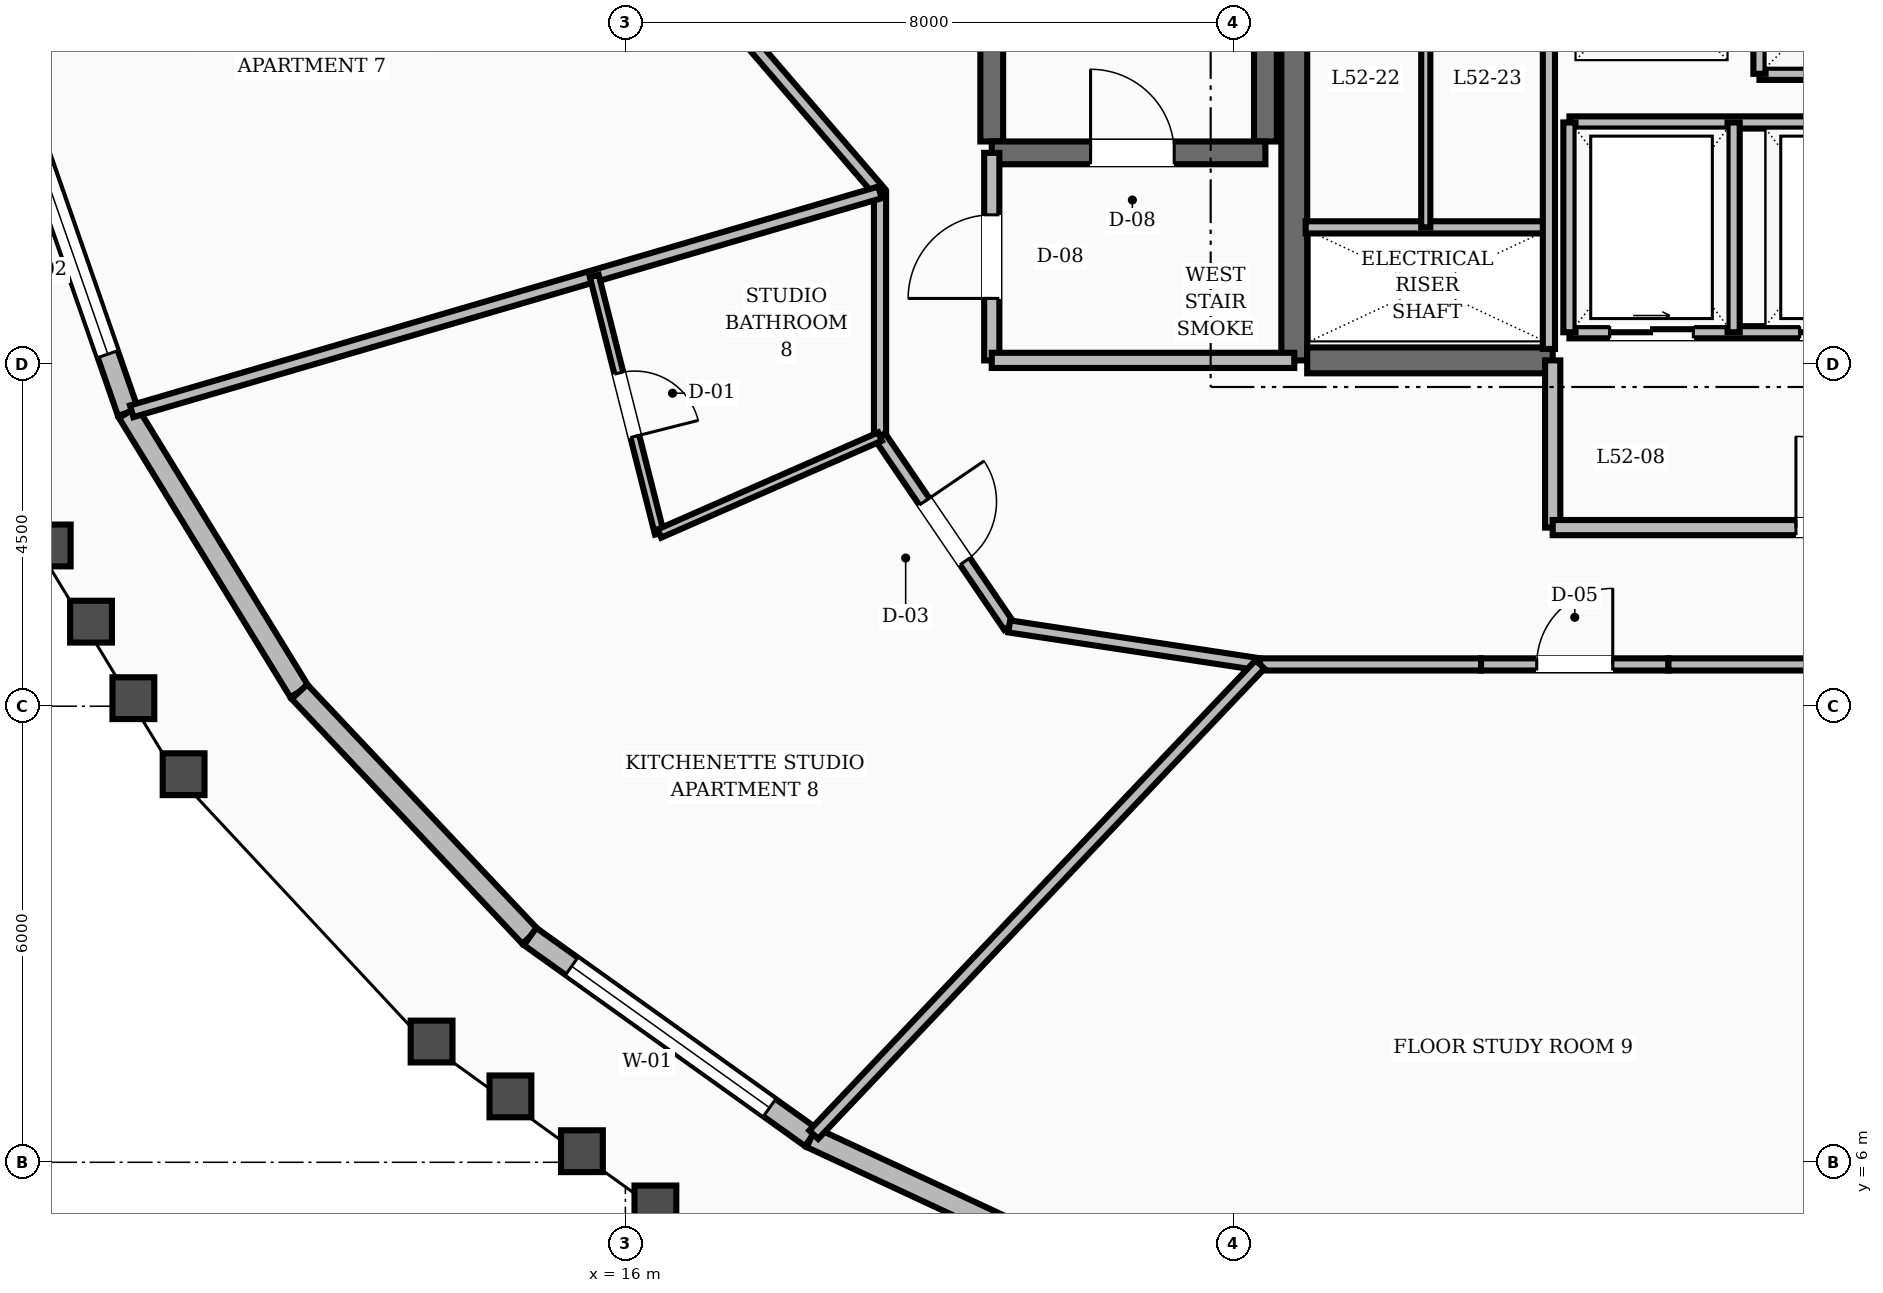
"""IFC4 building model, lengths in metres.
Left out: names, types, materials, properties, quantities, classifications, styles, units other than length and angle.
Written with IfcOpenShell. Run it as: python <this file> out.ifc"""

import sys

from ifc_helpers import new_model, si_unit, direction, frame, frame_2d, origin, place, context, subcontext, project, spatial, rectangle, extrude, element, fill, save


model = new_model("IFC4")
c1 = context("Model", 3, precision=1e-05, world=origin(), true_north=direction((0.0, 1.0)))
c2 = subcontext(c1, "Body", "Model", "MODEL_VIEW")
j1 = project(units=[si_unit("LENGTHUNIT", "METRE"), si_unit("PLANEANGLEUNIT", "RADIAN")], contexts=[c1])
p1 = place(None, origin())
s1 = spatial("IfcSite", under=j1, at=p1, CompositionType="ELEMENT")
p2 = place(p1, origin())
s2 = spatial("IfcBuilding", under=s1, at=p2, CompositionType="ELEMENT")
p3 = place(p2, frame((0.0, 0.0, 200.0)))
s3 = spatial("IfcBuildingStorey", under=s2, at=p3, CompositionType="ELEMENT", Elevation=200.0)
p4 = place(p3, frame((24.8, 16.55, 0.0), z_axis=(0.0, 0.0, 1.0), x_axis=(0.0, 1.0, 0.0)))
e1 = element("IfcWall", 1, at=p4, inside=s3, PredefinedType="SHEAR", context=c2, shape_type="SweptSolid", body=[
    extrude(rectangle(XDim=6.3, YDim=0.34, at=frame_2d((3.15, 0.0))), origin(), (0.0, 0.0, 1.0), 3.6),
])
p5 = place(p3, frame((24.97, 16.55, 0.0), z_axis=(0.0, 0.0, 1.0), x_axis=(1.0, 0.0, 0.0)))
e2 = element("IfcWall", 2, at=p5, inside=s3, PredefinedType="SHEAR", context=c2, shape_type="SweptSolid", body=[
    extrude(rectangle(XDim=3.23, YDim=0.34, at=frame_2d((1.615, 0.0))), origin(), (0.0, 0.0, 1.0), 3.6),
])
for number, where, z_axis, x_axis in (
    (3, (20.82, 19.43, 0.0), (0.0, 0.0, 1.0), (0.0, 1.0, 0.0)),
    (4, (24.42, 19.43, 0.0), (0.0, 0.0, 1.0), (0.0, 1.0, 0.0)),
):
    element("IfcWall", number, at=place(p3, frame(where, z_axis=z_axis, x_axis=x_axis)), inside=s3, PredefinedType="SHEAR", context=c2, shape_type="SweptSolid", body=[
        extrude(rectangle(XDim=8.74, YDim=0.3, at=frame_2d((4.37, 0.0))), origin(), (0.0, 0.0, 1.0), 3.6),
    ])
p6 = place(p3, frame((20.82, 19.28, 0.0), z_axis=(0.0, 0.0, 1.0), x_axis=(1.0, 0.0, 0.0)))
e5 = element("IfcWall", 5, at=p6, inside=s3, PredefinedType="SHEAR", context=c2, shape_type="SweptSolid", body=[
    extrude(rectangle(XDim=3.6, YDim=0.3, at=frame_2d((1.8, 0.0))), origin(), (0.0, 0.0, 1.0), 3.6),
])
p7 = place(p6, frame((1.3, 0.0, 0.0)))
e6 = element("IfcOpeningElement", 6, at=p7, cuts=e5, PredefinedType="OPENING", context=c2, shape_type="SweptSolid", body=[
    extrude(rectangle(XDim=1.1, YDim=2.1, at=frame_2d((0.55, 1.05))), frame((0.0, 0.16, 0.0), z_axis=(0.0, -1.0, 0.0), x_axis=(1.0, 0.0, 0.0)), (0.0, 0.0, 1.0), 0.32),
])
p8 = place(p3, frame((8.068, 19.853, 0.0), z_axis=(0.0, 0.0, 1.0), x_axis=(0.328845805233, -0.94438362776, 0.0)))
e7 = element("IfcWall", 7, at=p8, inside=s3, PredefinedType="STANDARD", context=c2, shape_type="SweptSolid", body=[
    extrude(rectangle(XDim=4.222, YDim=0.28, at=frame_2d((2.111, 0.0))), origin(), (0.0, 0.0, 1.0), 2.77),
])
p9 = place(p8, frame((0.811, 0.0, 0.8)))
e8 = element("IfcOpeningElement", 8, at=p9, cuts=e7, PredefinedType="OPENING", context=c2, shape_type="SweptSolid", body=[
    extrude(rectangle(XDim=2.6, YDim=1.65, at=frame_2d((1.3, 0.825))), frame((0.0, 0.15, 0.0), z_axis=(0.0, -1.0, 0.0), x_axis=(1.0, 0.0, 0.0)), (0.0, 0.0, 1.0), 0.3),
])
p10 = place(p3, frame((9.457, 15.866, 0.0), z_axis=(0.0, 0.0, 1.0), x_axis=(0.522997521468, -0.852334202375, 0.0)))
e9 = element("IfcWall", 9, at=p10, inside=s3, PredefinedType="STANDARD", context=c2, shape_type="SweptSolid", body=[
    extrude(rectangle(XDim=4.312, YDim=0.28, at=frame_2d((2.156, 0.0))), origin(), (0.0, 0.0, 1.0), 2.77),
])
p11 = place(p3, frame((11.712, 12.191, 0.0), z_axis=(0.0, 0.0, 1.0), x_axis=(0.685717407763, -0.727867870352, 0.0)))
e10 = element("IfcWall", 10, at=p11, inside=s3, PredefinedType="STANDARD", context=c2, shape_type="SweptSolid", body=[
    extrude(rectangle(XDim=4.425, YDim=0.28, at=frame_2d((2.213, 0.0))), origin(), (0.0, 0.0, 1.0), 2.77),
])
p12 = place(p3, frame((14.746, 8.97, 0.0), z_axis=(0.0, 0.0, 1.0), x_axis=(0.813519294528, -0.581537924327, 0.0)))
e11 = element("IfcWall", 11, at=p12, inside=s3, PredefinedType="STANDARD", context=c2, shape_type="SweptSolid", body=[
    extrude(rectangle(XDim=4.545, YDim=0.28, at=frame_2d((2.273, 0.0))), origin(), (0.0, 0.0, 1.0), 2.77),
])
p13 = place(p12, frame((0.673, 0.0, 0.8)))
e12 = element("IfcOpeningElement", 12, at=p13, cuts=e11, PredefinedType="OPENING", context=c2, shape_type="SweptSolid", body=[
    extrude(rectangle(XDim=3.2, YDim=1.65, at=frame_2d((1.6, 0.825))), frame((0.0, 0.15, 0.0), z_axis=(0.0, -1.0, 0.0), x_axis=(1.0, 0.0, 0.0)), (0.0, 0.0, 1.0), 0.3),
])
p14 = place(p3, frame((18.444, 6.327, 0.0), z_axis=(0.0, 0.0, 1.0), x_axis=(0.906555409807, -0.422086826315, 0.0)))
e13 = element("IfcWall", 13, at=p14, inside=s3, PredefinedType="STANDARD", context=c2, shape_type="SweptSolid", body=[
    extrude(rectangle(XDim=4.653, YDim=0.28, at=frame_2d((2.327, 0.0))), origin(), (0.0, 0.0, 1.0), 2.77),
])
p15 = place(p3, frame((20.82, 16.55, 0.0), z_axis=(0.0, 0.0, 1.0), x_axis=(0.0, 1.0, 0.0)))
e14 = element("IfcWall", 14, at=p15, inside=s3, PredefinedType="SOLIDWALL", context=c2, shape_type="SweptSolid", body=[
    extrude(rectangle(XDim=2.73, YDim=0.2, at=frame_2d((1.365, 0.0))), origin(), (0.0, 0.0, 1.0), 2.75),
])
p16 = place(p15, frame((0.815, 0.0, 0.0)))
e15 = element("IfcOpeningElement", 15, at=p16, cuts=e14, PredefinedType="OPENING", context=c2, shape_type="SweptSolid", body=[
    extrude(rectangle(XDim=1.1, YDim=2.1, at=frame_2d((0.55, 1.05))), frame((0.0, 0.11, 0.0), z_axis=(0.0, -1.0, 0.0), x_axis=(1.0, 0.0, 0.0)), (0.0, 0.0, 1.0), 0.22),
])
p17 = place(p3, frame((20.82, 16.55, 0.0), z_axis=(0.0, 0.0, 1.0), x_axis=(1.0, 0.0, 0.0)))
e16 = element("IfcWall", 16, at=p17, inside=s3, PredefinedType="SOLIDWALL", context=c2, shape_type="SweptSolid", body=[
    extrude(rectangle(XDim=3.98, YDim=0.2, at=frame_2d((1.99, 0.0))), origin(), (0.0, 0.0, 1.0), 2.75),
])
p18 = place(p3, frame((28.2, 14.35, 0.0), z_axis=(0.0, 0.0, 1.0), x_axis=(0.0, 1.0, 0.0)))
e17 = element("IfcWall", 17, at=p18, inside=s3, PredefinedType="SOLIDWALL", context=c2, shape_type="SweptSolid", body=[
    extrude(rectangle(XDim=2.2, YDim=0.2, at=frame_2d((1.1, 0.0))), origin(), (0.0, 0.0, 1.0), 2.75),
])
p19 = place(p3, frame((28.2, 14.35, 0.0), z_axis=(0.0, 0.0, 1.0), x_axis=(1.0, 0.0, 0.0)))
e18 = element("IfcWall", 18, at=p19, inside=s3, PredefinedType="SOLIDWALL", context=c2, shape_type="SweptSolid", body=[
    extrude(rectangle(XDim=7.6, YDim=0.2, at=frame_2d((3.8, 0.0))), origin(), (0.0, 0.0, 1.0), 2.75),
])
p20 = place(p19, frame((3.2, 0.0, 0.0)))
e19 = element("IfcOpeningElement", 19, at=p20, cuts=e18, PredefinedType="OPENING", context=c2, shape_type="SweptSolid", body=[
    extrude(rectangle(XDim=1.2, YDim=2.1, at=frame_2d((0.6, 1.05))), frame((0.0, 0.11, 0.0), z_axis=(0.0, -1.0, 0.0), x_axis=(1.0, 0.0, 0.0)), (0.0, 0.0, 1.0), 0.22),
])
p21 = place(p3, frame((30.92, 20.32, 0.0), z_axis=(0.0, 0.0, 1.0), x_axis=(1.0, 0.0, 0.0)))
e20 = element("IfcWall", 20, at=p21, inside=s3, PredefinedType="SOLIDWALL", context=c2, shape_type="SweptSolid", body=[
    extrude(rectangle(XDim=4.76, YDim=0.16, at=frame_2d((2.38, 0.0))), origin(), (0.0, 0.0, 1.0), 2.75),
])
p22 = place(p3, frame((30.92, 20.32, 0.0), z_axis=(0.0, 0.0, 1.0), x_axis=(0.0, 1.0, 0.0)))
e21 = element("IfcWall", 21, at=p22, inside=s3, PredefinedType="SOLIDWALL", context=c2, shape_type="SweptSolid", body=[
    extrude(rectangle(XDim=2.36, YDim=0.16, at=frame_2d((1.18, 0.0))), origin(), (0.0, 0.0, 1.0), 2.75),
])
p23 = place(p3, frame((28.42, 16.92, 0.0), z_axis=(0.0, 0.0, 1.0), x_axis=(1.0, 0.0, 0.0)))
e22 = element("IfcWall", 22, at=p23, inside=s3, PredefinedType="SOLIDWALL", context=c2, shape_type="SweptSolid", body=[
    extrude(rectangle(XDim=7.16, YDim=0.16, at=frame_2d((3.58, 0.0))), origin(), (0.0, 0.0, 1.0), 2.75),
])
p24 = place(p23, frame((0.53, 0.0, 0.0)))
e23 = element("IfcOpeningElement", 23, at=p24, cuts=e22, PredefinedType="OPENING", context=c2, shape_type="SweptSolid", body=[
    extrude(rectangle(XDim=1.1, YDim=2.15, at=frame_2d((0.55, 1.075))), frame((0.0, 0.09, 0.0), z_axis=(0.0, -1.0, 0.0), x_axis=(1.0, 0.0, 0.0)), (0.0, 0.0, 1.0), 0.18),
])
p25 = place(p23, frame((3.03, 0.0, 0.0)))
e24 = element("IfcOpeningElement", 24, at=p25, cuts=e22, PredefinedType="OPENING", context=c2, shape_type="SweptSolid", body=[
    extrude(rectangle(XDim=1.1, YDim=2.15, at=frame_2d((0.55, 1.075))), frame((0.0, 0.09, 0.0), z_axis=(0.0, -1.0, 0.0), x_axis=(1.0, 0.0, 0.0)), (0.0, 0.0, 1.0), 0.18),
])
p26 = place(p23, frame((5.53, 0.0, 0.0)))
e25 = element("IfcOpeningElement", 25, at=p26, cuts=e22, PredefinedType="OPENING", context=c2, shape_type="SweptSolid", body=[
    extrude(rectangle(XDim=1.1, YDim=2.15, at=frame_2d((0.55, 1.075))), frame((0.0, 0.09, 0.0), z_axis=(0.0, -1.0, 0.0), x_axis=(1.0, 0.0, 0.0)), (0.0, 0.0, 1.0), 0.18),
])
p27 = place(p3, frame((28.42, 19.68, 0.0), z_axis=(0.0, 0.0, 1.0), x_axis=(1.0, 0.0, 0.0)))
e26 = element("IfcWall", 26, at=p27, inside=s3, PredefinedType="SOLIDWALL", context=c2, shape_type="SweptSolid", body=[
    extrude(rectangle(XDim=7.16, YDim=0.16, at=frame_2d((3.58, 0.0))), origin(), (0.0, 0.0, 1.0), 2.75),
])
for number, where, z_axis, x_axis in (
    (27, (28.42, 16.92, 0.0), (0.0, 0.0, 1.0), (0.0, 1.0, 0.0)),
    (28, (30.58, 16.92, 0.0), (0.0, 0.0, 1.0), (0.0, 1.0, 0.0)),
):
    element("IfcWall", number, at=place(p3, frame(where, z_axis=z_axis, x_axis=x_axis)), inside=s3, PredefinedType="SOLIDWALL", context=c2, shape_type="SweptSolid", body=[
        extrude(rectangle(XDim=2.76, YDim=0.16, at=frame_2d((1.38, 0.0))), origin(), (0.0, 0.0, 1.0), 2.75),
    ])
p28 = place(p3, frame((24.95, 18.3, 0.0), z_axis=(0.0, 0.0, 1.0), x_axis=(1.0, 0.0, 0.0)))
e29 = element("IfcWall", 29, at=p28, inside=s3, PredefinedType="SOLIDWALL", context=c2, shape_type="SweptSolid", body=[
    extrude(rectangle(XDim=3.2, YDim=0.16, at=frame_2d((1.6, 0.0))), origin(), (0.0, 0.0, 1.0), 2.75),
])
p29 = place(p3, frame((28.15, 16.7, 0.0), z_axis=(0.0, 0.0, 1.0), x_axis=(0.0, 1.0, 0.0)))
e30 = element("IfcWall", 30, at=p29, inside=s3, PredefinedType="SOLIDWALL", context=c2, shape_type="SweptSolid", body=[
    extrude(rectangle(XDim=6.05, YDim=0.16, at=frame_2d((3.025, 0.0))), origin(), (0.0, 0.0, 1.0), 2.75),
])
p30 = place(p3, frame((26.53, 18.3, 0.0), z_axis=(0.0, 0.0, 1.0), x_axis=(0.0, 1.0, 0.0)))
e31 = element("IfcWall", 31, at=p30, inside=s3, PredefinedType="PARTITIONING", context=c2, shape_type="SweptSolid", body=[
    extrude(rectangle(XDim=4.45, YDim=0.12, at=frame_2d((2.225, 0.0))), origin(), (0.0, 0.0, 1.0), 2.75),
])
p31 = place(p3, frame((17.35, 21.086, 0.0), z_axis=(0.0, 0.0, 1.0), x_axis=(0.652022797448, -0.758199361388, 0.0)))
e32 = element("IfcWall", 32, at=p31, inside=s3, PredefinedType="SOLIDWALL", context=c2, shape_type="SweptSolid", body=[
    extrude(rectangle(XDim=3.067, YDim=0.16, at=frame_2d((1.534, 0.0))), origin(), (0.0, 0.0, 1.0), 2.75),
])
p32 = place(p3, frame((19.35, 18.76, 0.0), z_axis=(0.0, 0.0, 1.0), x_axis=(0.0, -1.0, 0.0)))
e33 = element("IfcWall", 33, at=p32, inside=s3, PredefinedType="SOLIDWALL", context=c2, shape_type="SweptSolid", body=[
    extrude(rectangle(XDim=3.213, YDim=0.16, at=frame_2d((1.606, 0.0))), origin(), (0.0, 0.0, 1.0), 2.75),
])
p33 = place(p3, frame((19.35, 15.548, 0.0), z_axis=(0.0, 0.0, 1.0), x_axis=(0.562674669208, -0.826678423955, 0.0)))
e34 = element("IfcWall", 34, at=p33, inside=s3, PredefinedType="SOLIDWALL", context=c2, shape_type="SweptSolid", body=[
    extrude(rectangle(XDim=3.021, YDim=0.16, at=frame_2d((1.511, 0.0))), origin(), (0.0, 0.0, 1.0), 2.75),
])
p34 = place(p33, frame((1.036, 0.0, 0.0)))
e35 = element("IfcOpeningElement", 35, at=p34, cuts=e34, PredefinedType="OPENING", context=c2, shape_type="SweptSolid", body=[
    extrude(rectangle(XDim=0.95, YDim=2.1, at=frame_2d((0.475, 1.05))), frame((0.0, 0.09, 0.0), z_axis=(0.0, -1.0, 0.0), x_axis=(1.0, 0.0, 0.0)), (0.0, 0.0, 1.0), 0.18),
])
p35 = place(p3, frame((21.05, 13.05, 0.0), z_axis=(0.0, 0.0, 1.0), x_axis=(0.988710906508, -0.149835721217, 0.0)))
e36 = element("IfcWall", 36, at=p35, inside=s3, PredefinedType="SOLIDWALL", context=c2, shape_type="SweptSolid", body=[
    extrude(rectangle(XDim=3.337, YDim=0.16, at=frame_2d((1.668, 0.0))), origin(), (0.0, 0.0, 1.0), 2.75),
])
p36 = place(p3, frame((24.349, 12.55, 0.0), z_axis=(0.0, 0.0, 1.0), x_axis=(1.0, 0.0, 0.0)))
e37 = element("IfcWall", 37, at=p36, inside=s3, PredefinedType="SOLIDWALL", context=c2, shape_type="SweptSolid", body=[
    extrude(rectangle(XDim=2.908, YDim=0.16, at=frame_2d((1.454, 0.0))), origin(), (0.0, 0.0, 1.0), 2.75),
])
p37 = place(p3, frame((27.257, 12.55, 0.0), z_axis=(0.0, 0.0, 1.0), x_axis=(1.0, 0.0, 0.0)))
e38 = element("IfcWall", 38, at=p37, inside=s3, PredefinedType="SOLIDWALL", context=c2, shape_type="SweptSolid", body=[
    extrude(rectangle(XDim=2.465, YDim=0.16, at=frame_2d((1.232, 0.0))), origin(), (0.0, 0.0, 1.0), 2.75),
])
p38 = place(p37, frame((0.733, 0.0, 0.0)))
e39 = element("IfcOpeningElement", 39, at=p38, cuts=e38, PredefinedType="OPENING", context=c2, shape_type="SweptSolid", body=[
    extrude(rectangle(XDim=1.0, YDim=2.1, at=frame_2d((0.5, 1.05))), frame((0.0, 0.09, 0.0), z_axis=(0.0, -1.0, 0.0), x_axis=(1.0, 0.0, 0.0)), (0.0, 0.0, 1.0), 0.18),
])
p39 = place(p3, frame((29.722, 12.55, 0.0), z_axis=(0.0, 0.0, 1.0), x_axis=(1.0, 0.0, 0.0)))
e40 = element("IfcWall", 40, at=p39, inside=s3, PredefinedType="SOLIDWALL", context=c2, shape_type="SweptSolid", body=[
    extrude(rectangle(XDim=2.278, YDim=0.16, at=frame_2d((1.139, 0.0))), origin(), (0.0, 0.0, 1.0), 2.75),
])
p40 = place(p3, frame((19.35, 18.76, 0.0), z_axis=(0.0, 0.0, 1.0), x_axis=(-0.959767761357, -0.280795021785, 0.0)))
e41 = element("IfcWall", 41, at=p40, inside=s3, PredefinedType="SOLIDWALL", context=c2, shape_type="SweptSolid", body=[
    extrude(rectangle(XDim=10.258, YDim=0.16, at=frame_2d((5.129, 0.0))), origin(), (0.0, 0.0, 1.0), 2.75),
])
p41 = place(p3, frame((15.591, 17.66, 0.0), z_axis=(0.0, 0.0, 1.0), x_axis=(0.245197489627, -0.969473151294, 0.0)))
e42 = element("IfcWall", 42, at=p41, inside=s3, PredefinedType="PARTITIONING", context=c2, shape_type="SweptSolid", body=[
    extrude(rectangle(XDim=3.495, YDim=0.12, at=frame_2d((1.748, 0.0))), origin(), (0.0, 0.0, 1.0), 2.75),
])
p42 = place(p41, frame((1.317, 0.0, 0.0)))
e43 = element("IfcOpeningElement", 43, at=p42, cuts=e42, PredefinedType="OPENING", context=c2, shape_type="SweptSolid", body=[
    extrude(rectangle(XDim=0.86, YDim=2.1, at=frame_2d((0.43, 1.05))), frame((0.0, 0.07, 0.0), z_axis=(0.0, -1.0, 0.0), x_axis=(1.0, 0.0, 0.0)), (0.0, 0.0, 1.0), 0.14),
])
p43 = place(p3, frame((19.35, 15.548, 0.0), z_axis=(0.0, 0.0, 1.0), x_axis=(-0.915518164914, -0.402276633317, 0.0)))
e44 = element("IfcWall", 44, at=p43, inside=s3, PredefinedType="PARTITIONING", context=c2, shape_type="SweptSolid", body=[
    extrude(rectangle(XDim=3.17, YDim=0.12, at=frame_2d((1.585, 0.0))), origin(), (0.0, 0.0, 1.0), 2.75),
])
p44 = place(p3, frame((24.349, 12.55, 0.0), z_axis=(0.0, 0.0, 1.0), x_axis=(-0.688358927094, -0.725370241662, 0.0)))
e45 = element("IfcWall", 45, at=p44, inside=s3, PredefinedType="SOLIDWALL", context=c2, shape_type="SweptSolid", body=[
    extrude(rectangle(XDim=8.529, YDim=0.16, at=frame_2d((4.265, 0.0))), origin(), (0.0, 0.0, 1.0), 2.75),
])
p45 = place(p9, origin())
e46 = element("IfcWindow", 46, at=p45, inside=s3, PartitioningType="SINGLE_PANEL", PredefinedType="WINDOW", context=c2, shape_type="SweptSolid", body=[
    extrude(rectangle(XDim=2.6, YDim=1.65, at=frame_2d((1.3, 0.825))), frame((0.0, 0.03, 0.0), z_axis=(0.0, -1.0, 0.0), x_axis=(1.0, 0.0, 0.0)), (0.0, 0.0, 1.0), 0.06),
])
fill(e8, e46)
p46 = place(p13, origin())
e47 = element("IfcWindow", 47, at=p46, inside=s3, PartitioningType="SINGLE_PANEL", PredefinedType="WINDOW", context=c2, shape_type="SweptSolid", body=[
    extrude(rectangle(XDim=3.2, YDim=1.65, at=frame_2d((1.6, 0.825))), frame((0.0, 0.03, 0.0), z_axis=(0.0, -1.0, 0.0), x_axis=(1.0, 0.0, 0.0)), (0.0, 0.0, 1.0), 0.06),
])
fill(e12, e47)
p47 = place(p7, origin())
e48 = element("IfcDoor", 48, at=p47, inside=s3, OperationType="SINGLE_SWING_LEFT", PredefinedType="DOOR", context=c2, shape_type="SweptSolid", body=[
    extrude(rectangle(XDim=1.1, YDim=2.1, at=frame_2d((0.55, 1.05))), frame((0.0, 0.025, 0.0), z_axis=(0.0, -1.0, 0.0), x_axis=(1.0, 0.0, 0.0)), (0.0, 0.0, 1.0), 0.05),
])
fill(e6, e48)
p48 = place(p16, origin())
e49 = element("IfcDoor", 49, at=p48, inside=s3, OperationType="SINGLE_SWING_LEFT", PredefinedType="DOOR", context=c2, shape_type="SweptSolid", body=[
    extrude(rectangle(XDim=1.1, YDim=2.1, at=frame_2d((0.55, 1.05))), frame((0.0, 0.025, 0.0), z_axis=(0.0, -1.0, 0.0), x_axis=(1.0, 0.0, 0.0)), (0.0, 0.0, 1.0), 0.05),
])
fill(e15, e49)
p49 = place(p20, origin())
e50 = element("IfcDoor", 50, at=p49, inside=s3, OperationType="SINGLE_SWING_LEFT", PredefinedType="DOOR", context=c2, shape_type="SweptSolid", body=[
    extrude(rectangle(XDim=1.2, YDim=2.1, at=frame_2d((0.6, 1.05))), frame((0.0, 0.025, 0.0), z_axis=(0.0, -1.0, 0.0), x_axis=(1.0, 0.0, 0.0)), (0.0, 0.0, 1.0), 0.05),
])
fill(e19, e50)
p50 = place(p24, origin())
e51 = element("IfcDoor", 51, at=p50, inside=s3, OperationType="SLIDING_TO_RIGHT", PredefinedType="DOOR", context=c2, shape_type="SweptSolid", body=[
    extrude(rectangle(XDim=1.1, YDim=2.15, at=frame_2d((0.55, 1.075))), frame((0.0, 0.025, 0.0), z_axis=(0.0, -1.0, 0.0), x_axis=(1.0, 0.0, 0.0)), (0.0, 0.0, 1.0), 0.05),
])
fill(e23, e51)
p51 = place(p25, origin())
e52 = element("IfcDoor", 52, at=p51, inside=s3, OperationType="SLIDING_TO_RIGHT", PredefinedType="DOOR", context=c2, shape_type="SweptSolid", body=[
    extrude(rectangle(XDim=1.1, YDim=2.15, at=frame_2d((0.55, 1.075))), frame((0.0, 0.025, 0.0), z_axis=(0.0, -1.0, 0.0), x_axis=(1.0, 0.0, 0.0)), (0.0, 0.0, 1.0), 0.05),
])
fill(e24, e52)
p52 = place(p42, origin())
e53 = element("IfcDoor", 53, at=p52, inside=s3, OperationType="SINGLE_SWING_RIGHT", PredefinedType="DOOR", context=c2, shape_type="SweptSolid", body=[
    extrude(rectangle(XDim=0.86, YDim=2.1, at=frame_2d((0.43, 1.05))), frame((0.0, 0.025, 0.0), z_axis=(0.0, -1.0, 0.0), x_axis=(1.0, 0.0, 0.0)), (0.0, 0.0, 1.0), 0.05),
])
fill(e43, e53)
p53 = place(p34, origin())
e54 = element("IfcDoor", 54, at=p53, inside=s3, OperationType="SINGLE_SWING_LEFT", PredefinedType="DOOR", context=c2, shape_type="SweptSolid", body=[
    extrude(rectangle(XDim=0.95, YDim=2.1, at=frame_2d((0.475, 1.05))), frame((0.0, 0.025, 0.0), z_axis=(0.0, -1.0, 0.0), x_axis=(1.0, 0.0, 0.0)), (0.0, 0.0, 1.0), 0.05),
])
fill(e35, e54)
p54 = place(p38, origin())
e55 = element("IfcDoor", 55, at=p54, inside=s3, OperationType="SINGLE_SWING_RIGHT", PredefinedType="DOOR", context=c2, shape_type="SweptSolid", body=[
    extrude(rectangle(XDim=1.0, YDim=2.1, at=frame_2d((0.5, 1.05))), frame((0.0, 0.025, 0.0), z_axis=(0.0, -1.0, 0.0), x_axis=(1.0, 0.0, 0.0)), (0.0, 0.0, 1.0), 0.05),
])
fill(e39, e55)
save(model, sys.argv[1])
